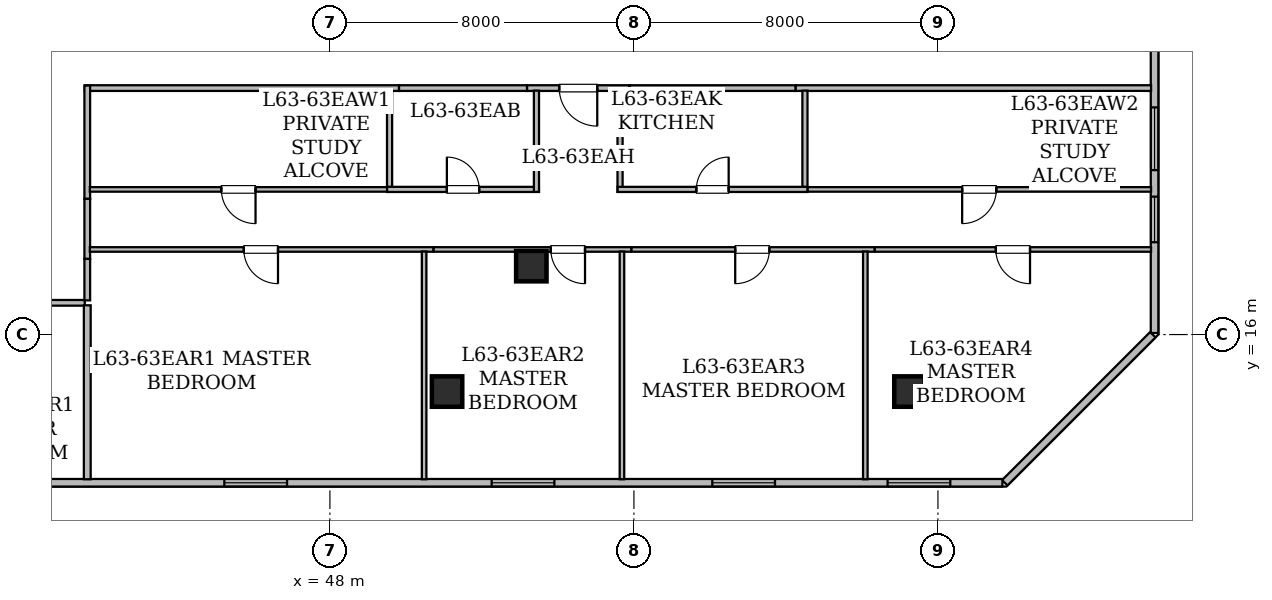
"""IFC4 building model, lengths in metres.
Left out: names, types, materials, properties, quantities, classifications, styles, units other than length and angle.
Written with IfcOpenShell. Run it as: python <this file> out.ifc"""

import sys

from ifc_helpers import new_model, si_unit, direction, frame, frame_2d, origin, origin_2d, place, context, subcontext, project, spatial, rectangle, hollow_rectangle, extrude, element, fill, save


model = new_model("IFC4")
c1 = context("Model", 3, precision=1e-05, world=origin(), true_north=direction((0.0, 1.0)))
c2 = subcontext(c1, "Body", "Model", "MODEL_VIEW")
j1 = project(units=[si_unit("LENGTHUNIT", "METRE"), si_unit("PLANEANGLEUNIT", "RADIAN")], contexts=[c1])
p1 = place(None, origin())
s1 = spatial("IfcSite", under=j1, at=p1, CompositionType="ELEMENT")
p2 = place(p1, origin())
s2 = spatial("IfcBuilding", under=s1, at=p2, CompositionType="ELEMENT")
p3 = place(p2, frame((0.0, 0.0, 246.4)))
s3 = spatial("IfcBuildingStorey", under=s2, at=p3, CompositionType="ELEMENT", Elevation=246.4)
for number, where, z_axis, x_axis in (
    (1, (51.083, 14.5, 0.0), (0.0, 0.0, 1.0), (1.0, 0.0, 0.0)),
    (2, (63.25, 14.5, 0.0), (0.0, 0.0, 1.0), (1.0, 0.0, 0.0)),
    (3, (67.2, 21.425, 0.0), (0.0, 0.0, 1.0), (1.0, 0.0, 0.0)),
    (4, (53.3, 17.8, 0.0), (0.0, 0.0, 1.0), (1.0, 0.0, 0.0)),
):
    element("IfcColumn", number, at=place(p3, frame(where, z_axis=z_axis, x_axis=x_axis)), inside=s3, PredefinedType="COLUMN", context=c2, shape_type="SweptSolid", body=[
        extrude(hollow_rectangle(XDim=0.8, YDim=0.8, WallThickness=0.04, at=origin_2d()), origin(), (0.0, 0.0, 1.0), 3.65),
    ])
p4 = place(p3, frame((69.7, 24.916, 0.0), z_axis=(0.0, 0.0, 1.0), x_axis=(0.0, -1.0, 0.0)))
e5 = element("IfcWall", 5, at=p4, inside=s3, PredefinedType="STANDARD", context=c2, shape_type="SweptSolid", body=[
    extrude(rectangle(XDim=8.875, YDim=0.2, at=frame_2d((4.438, 0.0))), origin(), (0.0, 0.0, 1.0), 3.43),
])
p5 = place(p4, frame((2.939, 0.0, 0.85)))
e6 = element("IfcOpeningElement", 6, at=p5, cuts=e5, PredefinedType="OPENING", context=c2, shape_type="SweptSolid", body=[
    extrude(rectangle(XDim=1.65, YDim=1.55, at=frame_2d((0.825, 0.775))), frame((0.0, 0.11, 0.0), z_axis=(0.0, -1.0, 0.0), x_axis=(1.0, 0.0, 0.0)), (0.0, 0.0, 1.0), 0.22),
])
p6 = place(p4, frame((5.287, 0.0, 0.8)))
e7 = element("IfcOpeningElement", 7, at=p6, cuts=e5, PredefinedType="OPENING", context=c2, shape_type="SweptSolid", body=[
    extrude(rectangle(XDim=1.2, YDim=1.5, at=frame_2d((0.6, 0.75))), frame((0.0, 0.11, 0.0), z_axis=(0.0, -1.0, 0.0), x_axis=(1.0, 0.0, 0.0)), (0.0, 0.0, 1.0), 0.22),
])
p7 = place(p3, frame((69.655, 15.996, 0.0), z_axis=(0.0, 0.0, 1.0), x_axis=(-0.707106781187, -0.707106781187, 0.0)))
e8 = element("IfcWall", 8, at=p7, inside=s3, PredefinedType="STANDARD", context=c2, shape_type="SweptSolid", body=[
    extrude(rectangle(XDim=5.51, YDim=0.2, at=frame_2d((2.755, 0.0))), origin(), (0.0, 0.0, 1.0), 3.43),
])
p8 = place(p3, frame((65.696, 12.1, 0.0), z_axis=(0.0, 0.0, 1.0), x_axis=(-1.0, 0.0, 0.0)))
e9 = element("IfcWall", 9, at=p8, inside=s3, PredefinedType="STANDARD", context=c2, shape_type="SweptSolid", body=[
    extrude(rectangle(XDim=41.393, YDim=0.2, at=frame_2d((20.697, 0.0))), origin(), (0.0, 0.0, 1.0), 3.43),
])
p9 = place(p8, frame((30.646, 0.0, 0.85)))
e10 = element("IfcOpeningElement", 10, at=p9, cuts=e9, PredefinedType="OPENING", context=c2, shape_type="SweptSolid", body=[
    extrude(rectangle(XDim=1.65, YDim=1.55, at=frame_2d((0.825, 0.775))), frame((0.0, 0.11, 0.0), z_axis=(0.0, -1.0, 0.0), x_axis=(1.0, 0.0, 0.0)), (0.0, 0.0, 1.0), 0.22),
])
p10 = place(p8, frame((25.339, 0.0, 0.85)))
e11 = element("IfcOpeningElement", 11, at=p10, cuts=e9, PredefinedType="OPENING", context=c2, shape_type="SweptSolid", body=[
    extrude(rectangle(XDim=1.65, YDim=1.55, at=frame_2d((0.825, 0.775))), frame((0.0, 0.11, 0.0), z_axis=(0.0, -1.0, 0.0), x_axis=(1.0, 0.0, 0.0)), (0.0, 0.0, 1.0), 0.22),
])
p11 = place(p8, frame((18.824, 0.0, 0.85)))
e12 = element("IfcOpeningElement", 12, at=p11, cuts=e9, PredefinedType="OPENING", context=c2, shape_type="SweptSolid", body=[
    extrude(rectangle(XDim=1.65, YDim=1.55, at=frame_2d((0.825, 0.775))), frame((0.0, 0.11, 0.0), z_axis=(0.0, -1.0, 0.0), x_axis=(1.0, 0.0, 0.0)), (0.0, 0.0, 1.0), 0.22),
])
p12 = place(p8, frame((11.789, 0.0, 0.85)))
e13 = element("IfcOpeningElement", 13, at=p12, cuts=e9, PredefinedType="OPENING", context=c2, shape_type="SweptSolid", body=[
    extrude(rectangle(XDim=1.65, YDim=1.55, at=frame_2d((0.825, 0.775))), frame((0.0, 0.11, 0.0), z_axis=(0.0, -1.0, 0.0), x_axis=(1.0, 0.0, 0.0)), (0.0, 0.0, 1.0), 0.22),
])
p13 = place(p8, frame((5.984, 0.0, 0.85)))
e14 = element("IfcOpeningElement", 14, at=p13, cuts=e9, PredefinedType="OPENING", context=c2, shape_type="SweptSolid", body=[
    extrude(rectangle(XDim=1.65, YDim=1.55, at=frame_2d((0.825, 0.775))), frame((0.0, 0.11, 0.0), z_axis=(0.0, -1.0, 0.0), x_axis=(1.0, 0.0, 0.0)), (0.0, 0.0, 1.0), 0.22),
])
p14 = place(p8, frame((1.371, 0.0, 0.85)))
e15 = element("IfcOpeningElement", 15, at=p14, cuts=e9, PredefinedType="OPENING", context=c2, shape_type="SweptSolid", body=[
    extrude(rectangle(XDim=1.65, YDim=1.55, at=frame_2d((0.825, 0.775))), frame((0.0, 0.11, 0.0), z_axis=(0.0, -1.0, 0.0), x_axis=(1.0, 0.0, 0.0)), (0.0, 0.0, 1.0), 0.22),
])
p15 = place(p3, frame((41.55, 16.835, 0.0), z_axis=(0.0, 0.0, 1.0), x_axis=(-1.0, 0.0, 0.0)))
e16 = element("IfcWall", 16, at=p15, inside=s3, PredefinedType="STANDARD", context=c2, shape_type="SweptSolid", body=[
    extrude(rectangle(XDim=3.851, YDim=0.15, at=frame_2d((1.926, 0.0))), origin(), (0.0, 0.0, 1.0), 2.725),
])
p16 = place(p3, frame((49.819, 22.485, 0.0), z_axis=(0.0, 0.0, 1.0), x_axis=(-1.0, 0.0, 0.0)))
e17 = element("IfcWall", 17, at=p16, inside=s3, PredefinedType="STANDARD", context=c2, shape_type="SweptSolid", body=[
    extrude(rectangle(XDim=8.269, YDim=0.15, at=frame_2d((4.135, 0.0))), origin(), (0.0, 0.0, 1.0), 3.43),
])
p17 = place(p3, frame((41.615, 22.55, 0.0), z_axis=(0.0, 0.0, 1.0), x_axis=(0.0, -1.0, 0.0)))
e18 = element("IfcWall", 18, at=p17, inside=s3, PredefinedType="STANDARD", context=c2, shape_type="SweptSolid", body=[
    extrude(rectangle(XDim=2.98, YDim=0.15, at=frame_2d((1.49, 0.0))), origin(), (0.0, 0.0, 1.0), 3.43),
])
p18 = place(p3, frame((69.608, 22.485, 0.0), z_axis=(0.0, 0.0, 1.0), x_axis=(-1.0, 0.0, 0.0)))
e19 = element("IfcWall", 19, at=p18, inside=s3, PredefinedType="STANDARD", context=c2, shape_type="SweptSolid", body=[
    extrude(rectangle(XDim=9.357, YDim=0.15, at=frame_2d((4.678, 0.0))), origin(), (0.0, 0.0, 1.0), 2.887),
])
p19 = place(p3, frame((55.884, 22.485, 0.0), z_axis=(0.0, 0.0, 1.0), x_axis=(-1.0, 0.0, 0.0)))
e20 = element("IfcWall", 20, at=p19, inside=s3, PredefinedType="STANDARD", context=c2, shape_type="SweptSolid", body=[
    extrude(rectangle(XDim=2.698, YDim=0.15, at=frame_2d((1.349, 0.0))), origin(), (0.0, 0.0, 1.0), 2.725),
])
p20 = place(p19, frame((0.849, 0.0, 0.0)))
e21 = element("IfcOpeningElement", 21, at=p20, cuts=e20, PredefinedType="OPENING", context=c2, shape_type="SweptSolid", body=[
    extrude(rectangle(XDim=1.0, YDim=2.15, at=frame_2d((0.5, 1.075))), frame((0.0, 0.085, 0.0), z_axis=(0.0, -1.0, 0.0), x_axis=(1.0, 0.0, 0.0)), (0.0, 0.0, 1.0), 0.17),
])
p21 = place(p3, frame((41.615, 19.57, 0.0), z_axis=(0.0, 0.0, 1.0), x_axis=(0.0, -1.0, 0.0)))
e22 = element("IfcWall", 22, at=p21, inside=s3, PredefinedType="STANDARD", context=c2, shape_type="SweptSolid", body=[
    extrude(rectangle(XDim=1.58, YDim=0.15, at=frame_2d((0.79, 0.0))), origin(), (0.0, 0.0, 1.0), 2.725),
])
p22 = place(p3, frame((53.186, 22.485, 0.0), z_axis=(0.0, 0.0, 1.0), x_axis=(-1.0, 0.0, 0.0)))
e23 = element("IfcWall", 23, at=p22, inside=s3, PredefinedType="STANDARD", context=c2, shape_type="SweptSolid", body=[
    extrude(rectangle(XDim=3.367, YDim=0.15, at=frame_2d((1.684, 0.0))), origin(), (0.0, 0.0, 1.0), 2.725),
])
p23 = place(p3, frame((60.251, 22.485, 0.0), z_axis=(0.0, 0.0, 1.0), x_axis=(-1.0, 0.0, 0.0)))
e24 = element("IfcWall", 24, at=p23, inside=s3, PredefinedType="STANDARD", context=c2, shape_type="SweptSolid", body=[
    extrude(rectangle(XDim=4.367, YDim=0.15, at=frame_2d((2.184, 0.0))), origin(), (0.0, 0.0, 1.0), 3.43),
])
p24 = place(p3, frame((41.615, 17.99, 0.0), z_axis=(0.0, 0.0, 1.0), x_axis=(0.0, -1.0, 0.0)))
e25 = element("IfcWall", 25, at=p24, inside=s3, PredefinedType="STANDARD", context=c2, shape_type="SweptSolid", body=[
    extrude(rectangle(XDim=1.09, YDim=0.15, at=frame_2d((0.545, 0.0))), origin(), (0.0, 0.0, 1.0), 2.725),
])
p25 = place(p3, frame((41.615, 16.77, 0.0), z_axis=(0.0, 0.0, 1.0), x_axis=(0.0, -1.0, 0.0)))
e26 = element("IfcWall", 26, at=p25, inside=s3, PredefinedType="STANDARD", context=c2, shape_type="SweptSolid", body=[
    extrude(rectangle(XDim=4.578, YDim=0.18, at=frame_2d((2.289, 0.0))), origin(), (0.0, 0.0, 1.0), 2.887),
])
p26 = place(p3, frame((49.505, 19.819, 0.0), z_axis=(0.0, 0.0, 1.0), x_axis=(-1.0, 0.0, 0.0)))
e27 = element("IfcWall", 27, at=p26, inside=s3, PredefinedType="PARTITIONING", context=c2, shape_type="SweptSolid", body=[
    extrude(rectangle(XDim=7.823, YDim=0.12, at=frame_2d((3.912, 0.0))), origin(), (0.0, 0.0, 1.0), 3.43),
])
p27 = place(p26, frame((3.462, 0.0, 0.0)))
e28 = element("IfcOpeningElement", 28, at=p27, cuts=e27, PredefinedType="OPENING", context=c2, shape_type="SweptSolid", body=[
    extrude(rectangle(XDim=0.9, YDim=2.1, at=frame_2d((0.45, 1.05))), frame((0.0, 0.07, 0.0), z_axis=(0.0, -1.0, 0.0), x_axis=(1.0, 0.0, 0.0)), (0.0, 0.0, 1.0), 0.14),
])
p28 = place(p3, frame((49.57, 22.418, 0.0), z_axis=(0.0, 0.0, 1.0), x_axis=(0.0, -1.0, 0.0)))
e29 = element("IfcWall", 29, at=p28, inside=s3, PredefinedType="PARTITIONING", context=c2, shape_type="SweptSolid", body=[
    extrude(rectangle(XDim=2.534, YDim=0.135, at=frame_2d((1.267, 0.0))), origin(), (0.0, 0.0, 1.0), 3.43),
])
p29 = place(p3, frame((69.608, 19.819, 0.0), z_axis=(0.0, 0.0, 1.0), x_axis=(-1.0, 0.0, 0.0)))
e30 = element("IfcWall", 30, at=p29, inside=s3, PredefinedType="PARTITIONING", context=c2, shape_type="SweptSolid", body=[
    extrude(rectangle(XDim=9.043, YDim=0.12, at=frame_2d((4.521, 0.0))), origin(), (0.0, 0.0, 1.0), 2.725),
])
p30 = place(p29, frame((4.071, 0.0, 0.0)))
e31 = element("IfcOpeningElement", 31, at=p30, cuts=e30, PredefinedType="OPENING", context=c2, shape_type="SweptSolid", body=[
    extrude(rectangle(XDim=0.9, YDim=2.1, at=frame_2d((0.45, 1.05))), frame((0.0, 0.07, 0.0), z_axis=(0.0, -1.0, 0.0), x_axis=(1.0, 0.0, 0.0)), (0.0, 0.0, 1.0), 0.14),
])
p31 = place(p3, frame((60.5, 19.884, 0.0), z_axis=(0.0, 0.0, 1.0), x_axis=(0.0, 1.0, 0.0)))
e32 = element("IfcWall", 32, at=p31, inside=s3, PredefinedType="PARTITIONING", context=c2, shape_type="SweptSolid", body=[
    extrude(rectangle(XDim=2.534, YDim=0.135, at=frame_2d((1.267, 0.0))), origin(), (0.0, 0.0, 1.0), 3.43),
])
p32 = place(p3, frame((49.505, 19.819, 0.0), z_axis=(0.0, 0.0, 1.0), x_axis=(1.0, 0.0, 0.0)))
e33 = element("IfcWall", 33, at=p32, inside=s3, PredefinedType="PARTITIONING", context=c2, shape_type="SweptSolid", body=[
    extrude(rectangle(XDim=3.995, YDim=0.135, at=frame_2d((1.998, 0.0))), origin(), (0.0, 0.0, 1.0), 2.725),
])
p33 = place(p32, frame((1.573, 0.0, 0.0)))
e34 = element("IfcOpeningElement", 34, at=p33, cuts=e33, PredefinedType="OPENING", context=c2, shape_type="SweptSolid", body=[
    extrude(rectangle(XDim=0.85, YDim=2.1, at=frame_2d((0.425, 1.05))), frame((0.0, 0.077, 0.0), z_axis=(0.0, -1.0, 0.0), x_axis=(1.0, 0.0, 0.0)), (0.0, 0.0, 1.0), 0.155),
])
p34 = place(p3, frame((53.435, 19.754, 0.0), z_axis=(0.0, 0.0, 1.0), x_axis=(0.0, 1.0, 0.0)))
e35 = element("IfcWall", 35, at=p34, inside=s3, PredefinedType="PARTITIONING", context=c2, shape_type="SweptSolid", body=[
    extrude(rectangle(XDim=2.664, YDim=0.135, at=frame_2d((1.332, 0.0))), origin(), (0.0, 0.0, 1.0), 2.725),
])
p35 = place(p3, frame((55.635, 22.418, 0.0), z_axis=(0.0, 0.0, 1.0), x_axis=(0.0, -1.0, 0.0)))
e36 = element("IfcWall", 36, at=p35, inside=s3, PredefinedType="PARTITIONING", context=c2, shape_type="SweptSolid", body=[
    extrude(rectangle(XDim=2.664, YDim=0.135, at=frame_2d((1.332, 0.0))), origin(), (0.0, 0.0, 1.0), 3.43),
])
p36 = place(p3, frame((55.57, 19.819, 0.0), z_axis=(0.0, 0.0, 1.0), x_axis=(1.0, 0.0, 0.0)))
e37 = element("IfcWall", 37, at=p36, inside=s3, PredefinedType="PARTITIONING", context=c2, shape_type="SweptSolid", body=[
    extrude(rectangle(XDim=4.995, YDim=0.135, at=frame_2d((2.498, 0.0))), origin(), (0.0, 0.0, 1.0), 2.725),
])
p37 = place(p36, frame((2.073, 0.0, 0.0)))
e38 = element("IfcOpeningElement", 38, at=p37, cuts=e37, PredefinedType="OPENING", context=c2, shape_type="SweptSolid", body=[
    extrude(rectangle(XDim=0.85, YDim=2.1, at=frame_2d((0.425, 1.05))), frame((0.0, 0.077, 0.0), z_axis=(0.0, -1.0, 0.0), x_axis=(1.0, 0.0, 0.0)), (0.0, 0.0, 1.0), 0.155),
])
p38 = place(p3, frame((50.728, 18.239, 0.0), z_axis=(0.0, 0.0, 1.0), x_axis=(-1.0, 0.0, 0.0)))
e39 = element("IfcWall", 39, at=p38, inside=s3, PredefinedType="PARTITIONING", context=c2, shape_type="SweptSolid", body=[
    extrude(rectangle(XDim=9.046, YDim=0.12, at=frame_2d((4.523, 0.0))), origin(), (0.0, 0.0, 1.0), 2.725),
])
p39 = place(p38, frame((4.094, 0.0, 0.0)))
e40 = element("IfcOpeningElement", 40, at=p39, cuts=e39, PredefinedType="OPENING", context=c2, shape_type="SweptSolid", body=[
    extrude(rectangle(XDim=0.9, YDim=2.1, at=frame_2d((0.45, 1.05))), frame((0.0, 0.07, 0.0), z_axis=(0.0, -1.0, 0.0), x_axis=(1.0, 0.0, 0.0)), (0.0, 0.0, 1.0), 0.14),
])
p40 = place(p3, frame((55.934, 18.239, 0.0), z_axis=(0.0, 0.0, 1.0), x_axis=(-1.0, 0.0, 0.0)))
e41 = element("IfcWall", 41, at=p40, inside=s3, PredefinedType="PARTITIONING", context=c2, shape_type="SweptSolid", body=[
    extrude(rectangle(XDim=5.206, YDim=0.12, at=frame_2d((2.603, 0.0))), origin(), (0.0, 0.0, 1.0), 2.725),
])
p41 = place(p40, frame((1.221, 0.0, 0.0)))
e42 = element("IfcOpeningElement", 42, at=p41, cuts=e41, PredefinedType="OPENING", context=c2, shape_type="SweptSolid", body=[
    extrude(rectangle(XDim=0.9, YDim=2.1, at=frame_2d((0.45, 1.05))), frame((0.0, 0.07, 0.0), z_axis=(0.0, -1.0, 0.0), x_axis=(1.0, 0.0, 0.0)), (0.0, 0.0, 1.0), 0.14),
])
p42 = place(p3, frame((62.338, 18.239, 0.0), z_axis=(0.0, 0.0, 1.0), x_axis=(-1.0, 0.0, 0.0)))
e43 = element("IfcWall", 43, at=p42, inside=s3, PredefinedType="PARTITIONING", context=c2, shape_type="SweptSolid", body=[
    extrude(rectangle(XDim=6.404, YDim=0.12, at=frame_2d((3.202, 0.0))), origin(), (0.0, 0.0, 1.0), 2.725),
])
p43 = place(p42, frame((2.773, 0.0, 0.0)))
e44 = element("IfcOpeningElement", 44, at=p43, cuts=e43, PredefinedType="OPENING", context=c2, shape_type="SweptSolid", body=[
    extrude(rectangle(XDim=0.9, YDim=2.1, at=frame_2d((0.45, 1.05))), frame((0.0, 0.07, 0.0), z_axis=(0.0, -1.0, 0.0), x_axis=(1.0, 0.0, 0.0)), (0.0, 0.0, 1.0), 0.14),
])
p44 = place(p3, frame((69.608, 18.239, 0.0), z_axis=(0.0, 0.0, 1.0), x_axis=(-1.0, 0.0, 0.0)))
e45 = element("IfcWall", 45, at=p44, inside=s3, PredefinedType="PARTITIONING", context=c2, shape_type="SweptSolid", body=[
    extrude(rectangle(XDim=7.27, YDim=0.12, at=frame_2d((3.635, 0.0))), origin(), (0.0, 0.0, 1.0), 2.887),
])
p45 = place(p44, frame((3.185, 0.0, 0.0)))
e46 = element("IfcOpeningElement", 46, at=p45, cuts=e45, PredefinedType="OPENING", context=c2, shape_type="SweptSolid", body=[
    extrude(rectangle(XDim=0.9, YDim=2.1, at=frame_2d((0.45, 1.05))), frame((0.0, 0.07, 0.0), z_axis=(0.0, -1.0, 0.0), x_axis=(1.0, 0.0, 0.0)), (0.0, 0.0, 1.0), 0.14),
])
for number, where, z_axis, x_axis in (
    (47, (50.479, 18.185, 0.0), (0.0, 0.0, 1.0), (0.0, -1.0, 0.0)),
    (48, (55.685, 18.185, 0.0), (0.0, 0.0, 1.0), (0.0, -1.0, 0.0)),
    (49, (62.089, 18.185, 0.0), (0.0, 0.0, 1.0), (0.0, -1.0, 0.0)),
):
    element("IfcWall", number, at=place(p3, frame(where, z_axis=z_axis, x_axis=x_axis)), inside=s3, PredefinedType="PARTITIONING", context=c2, shape_type="SweptSolid", body=[
        extrude(rectangle(XDim=5.993, YDim=0.12, at=frame_2d((2.997, 0.0))), origin(), (0.0, 0.0, 1.0), 2.725),
    ])
p46 = place(p5, origin())
e50 = element("IfcWindow", 50, at=p46, inside=s3, PartitioningType="SINGLE_PANEL", PredefinedType="WINDOW", context=c2, shape_type="SweptSolid", body=[
    extrude(rectangle(XDim=1.65, YDim=1.55, at=frame_2d((0.825, 0.775))), frame((0.0, 0.03, 0.0), z_axis=(0.0, -1.0, 0.0), x_axis=(1.0, 0.0, 0.0)), (0.0, 0.0, 1.0), 0.06),
])
fill(e6, e50)
p47 = place(p6, origin())
e51 = element("IfcWindow", 51, at=p47, inside=s3, PartitioningType="SINGLE_PANEL", PredefinedType="WINDOW", context=c2, shape_type="SweptSolid", body=[
    extrude(rectangle(XDim=1.2, YDim=1.5, at=frame_2d((0.6, 0.75))), frame((0.0, 0.03, 0.0), z_axis=(0.0, -1.0, 0.0), x_axis=(1.0, 0.0, 0.0)), (0.0, 0.0, 1.0), 0.06),
])
fill(e7, e51)
p48 = place(p11, origin())
e52 = element("IfcWindow", 52, at=p48, inside=s3, PartitioningType="SINGLE_PANEL", PredefinedType="WINDOW", context=c2, shape_type="SweptSolid", body=[
    extrude(rectangle(XDim=1.65, YDim=1.55, at=frame_2d((0.825, 0.775))), frame((0.0, 0.03, 0.0), z_axis=(0.0, -1.0, 0.0), x_axis=(1.0, 0.0, 0.0)), (0.0, 0.0, 1.0), 0.06),
])
fill(e12, e52)
p49 = place(p12, origin())
e53 = element("IfcWindow", 53, at=p49, inside=s3, PartitioningType="SINGLE_PANEL", PredefinedType="WINDOW", context=c2, shape_type="SweptSolid", body=[
    extrude(rectangle(XDim=1.65, YDim=1.55, at=frame_2d((0.825, 0.775))), frame((0.0, 0.03, 0.0), z_axis=(0.0, -1.0, 0.0), x_axis=(1.0, 0.0, 0.0)), (0.0, 0.0, 1.0), 0.06),
])
fill(e13, e53)
p50 = place(p13, origin())
e54 = element("IfcWindow", 54, at=p50, inside=s3, PartitioningType="SINGLE_PANEL", PredefinedType="WINDOW", context=c2, shape_type="SweptSolid", body=[
    extrude(rectangle(XDim=1.65, YDim=1.55, at=frame_2d((0.825, 0.775))), frame((0.0, 0.03, 0.0), z_axis=(0.0, -1.0, 0.0), x_axis=(1.0, 0.0, 0.0)), (0.0, 0.0, 1.0), 0.06),
])
fill(e14, e54)
p51 = place(p14, origin())
e55 = element("IfcWindow", 55, at=p51, inside=s3, PartitioningType="SINGLE_PANEL", PredefinedType="WINDOW", context=c2, shape_type="SweptSolid", body=[
    extrude(rectangle(XDim=1.65, YDim=1.55, at=frame_2d((0.825, 0.775))), frame((0.0, 0.03, 0.0), z_axis=(0.0, -1.0, 0.0), x_axis=(1.0, 0.0, 0.0)), (0.0, 0.0, 1.0), 0.06),
])
fill(e15, e55)
p52 = place(p20, origin())
e56 = element("IfcDoor", 56, at=p52, inside=s3, OperationType="SINGLE_SWING_LEFT", PredefinedType="DOOR", context=c2, shape_type="SweptSolid", body=[
    extrude(rectangle(XDim=1.0, YDim=2.15, at=frame_2d((0.5, 1.075))), frame((0.0, 0.025, 0.0), z_axis=(0.0, -1.0, 0.0), x_axis=(1.0, 0.0, 0.0)), (0.0, 0.0, 1.0), 0.05),
])
fill(e21, e56)
p53 = place(p27, origin())
e57 = element("IfcDoor", 57, at=p53, inside=s3, OperationType="SINGLE_SWING_LEFT", PredefinedType="DOOR", context=c2, shape_type="SweptSolid", body=[
    extrude(rectangle(XDim=0.9, YDim=2.1, at=frame_2d((0.45, 1.05))), frame((0.0, 0.025, 0.0), z_axis=(0.0, -1.0, 0.0), x_axis=(1.0, 0.0, 0.0)), (0.0, 0.0, 1.0), 0.05),
])
fill(e28, e57)
p54 = place(p30, origin())
e58 = element("IfcDoor", 58, at=p54, inside=s3, OperationType="SINGLE_SWING_RIGHT", PredefinedType="DOOR", context=c2, shape_type="SweptSolid", body=[
    extrude(rectangle(XDim=0.9, YDim=2.1, at=frame_2d((0.45, 1.05))), frame((0.0, 0.025, 0.0), z_axis=(0.0, -1.0, 0.0), x_axis=(1.0, 0.0, 0.0)), (0.0, 0.0, 1.0), 0.05),
])
fill(e31, e58)
p55 = place(p33, origin())
e59 = element("IfcDoor", 59, at=p55, inside=s3, OperationType="SINGLE_SWING_LEFT", PredefinedType="DOOR", context=c2, shape_type="SweptSolid", body=[
    extrude(rectangle(XDim=0.85, YDim=2.1, at=frame_2d((0.425, 1.05))), frame((0.0, 0.025, 0.0), z_axis=(0.0, -1.0, 0.0), x_axis=(1.0, 0.0, 0.0)), (0.0, 0.0, 1.0), 0.05),
])
fill(e34, e59)
p56 = place(p37, origin())
e60 = element("IfcDoor", 60, at=p56, inside=s3, OperationType="SINGLE_SWING_RIGHT", PredefinedType="DOOR", context=c2, shape_type="SweptSolid", body=[
    extrude(rectangle(XDim=0.85, YDim=2.1, at=frame_2d((0.425, 1.05))), frame((0.0, 0.025, 0.0), z_axis=(0.0, -1.0, 0.0), x_axis=(1.0, 0.0, 0.0)), (0.0, 0.0, 1.0), 0.05),
])
fill(e38, e60)
p57 = place(p39, origin())
e61 = element("IfcDoor", 61, at=p57, inside=s3, OperationType="SINGLE_SWING_LEFT", PredefinedType="DOOR", context=c2, shape_type="SweptSolid", body=[
    extrude(rectangle(XDim=0.9, YDim=2.1, at=frame_2d((0.45, 1.05))), frame((0.0, 0.025, 0.0), z_axis=(0.0, -1.0, 0.0), x_axis=(1.0, 0.0, 0.0)), (0.0, 0.0, 1.0), 0.05),
])
fill(e40, e61)
p58 = place(p41, origin())
e62 = element("IfcDoor", 62, at=p58, inside=s3, OperationType="SINGLE_SWING_LEFT", PredefinedType="DOOR", context=c2, shape_type="SweptSolid", body=[
    extrude(rectangle(XDim=0.9, YDim=2.1, at=frame_2d((0.45, 1.05))), frame((0.0, 0.025, 0.0), z_axis=(0.0, -1.0, 0.0), x_axis=(1.0, 0.0, 0.0)), (0.0, 0.0, 1.0), 0.05),
])
fill(e42, e62)
p59 = place(p43, origin())
e63 = element("IfcDoor", 63, at=p59, inside=s3, OperationType="SINGLE_SWING_RIGHT", PredefinedType="DOOR", context=c2, shape_type="SweptSolid", body=[
    extrude(rectangle(XDim=0.9, YDim=2.1, at=frame_2d((0.45, 1.05))), frame((0.0, 0.025, 0.0), z_axis=(0.0, -1.0, 0.0), x_axis=(1.0, 0.0, 0.0)), (0.0, 0.0, 1.0), 0.05),
])
fill(e44, e63)
p60 = place(p45, origin())
e64 = element("IfcDoor", 64, at=p60, inside=s3, OperationType="SINGLE_SWING_LEFT", PredefinedType="DOOR", context=c2, shape_type="SweptSolid", body=[
    extrude(rectangle(XDim=0.9, YDim=2.1, at=frame_2d((0.45, 1.05))), frame((0.0, 0.025, 0.0), z_axis=(0.0, -1.0, 0.0), x_axis=(1.0, 0.0, 0.0)), (0.0, 0.0, 1.0), 0.05),
])
fill(e46, e64)
save(model, sys.argv[1])
